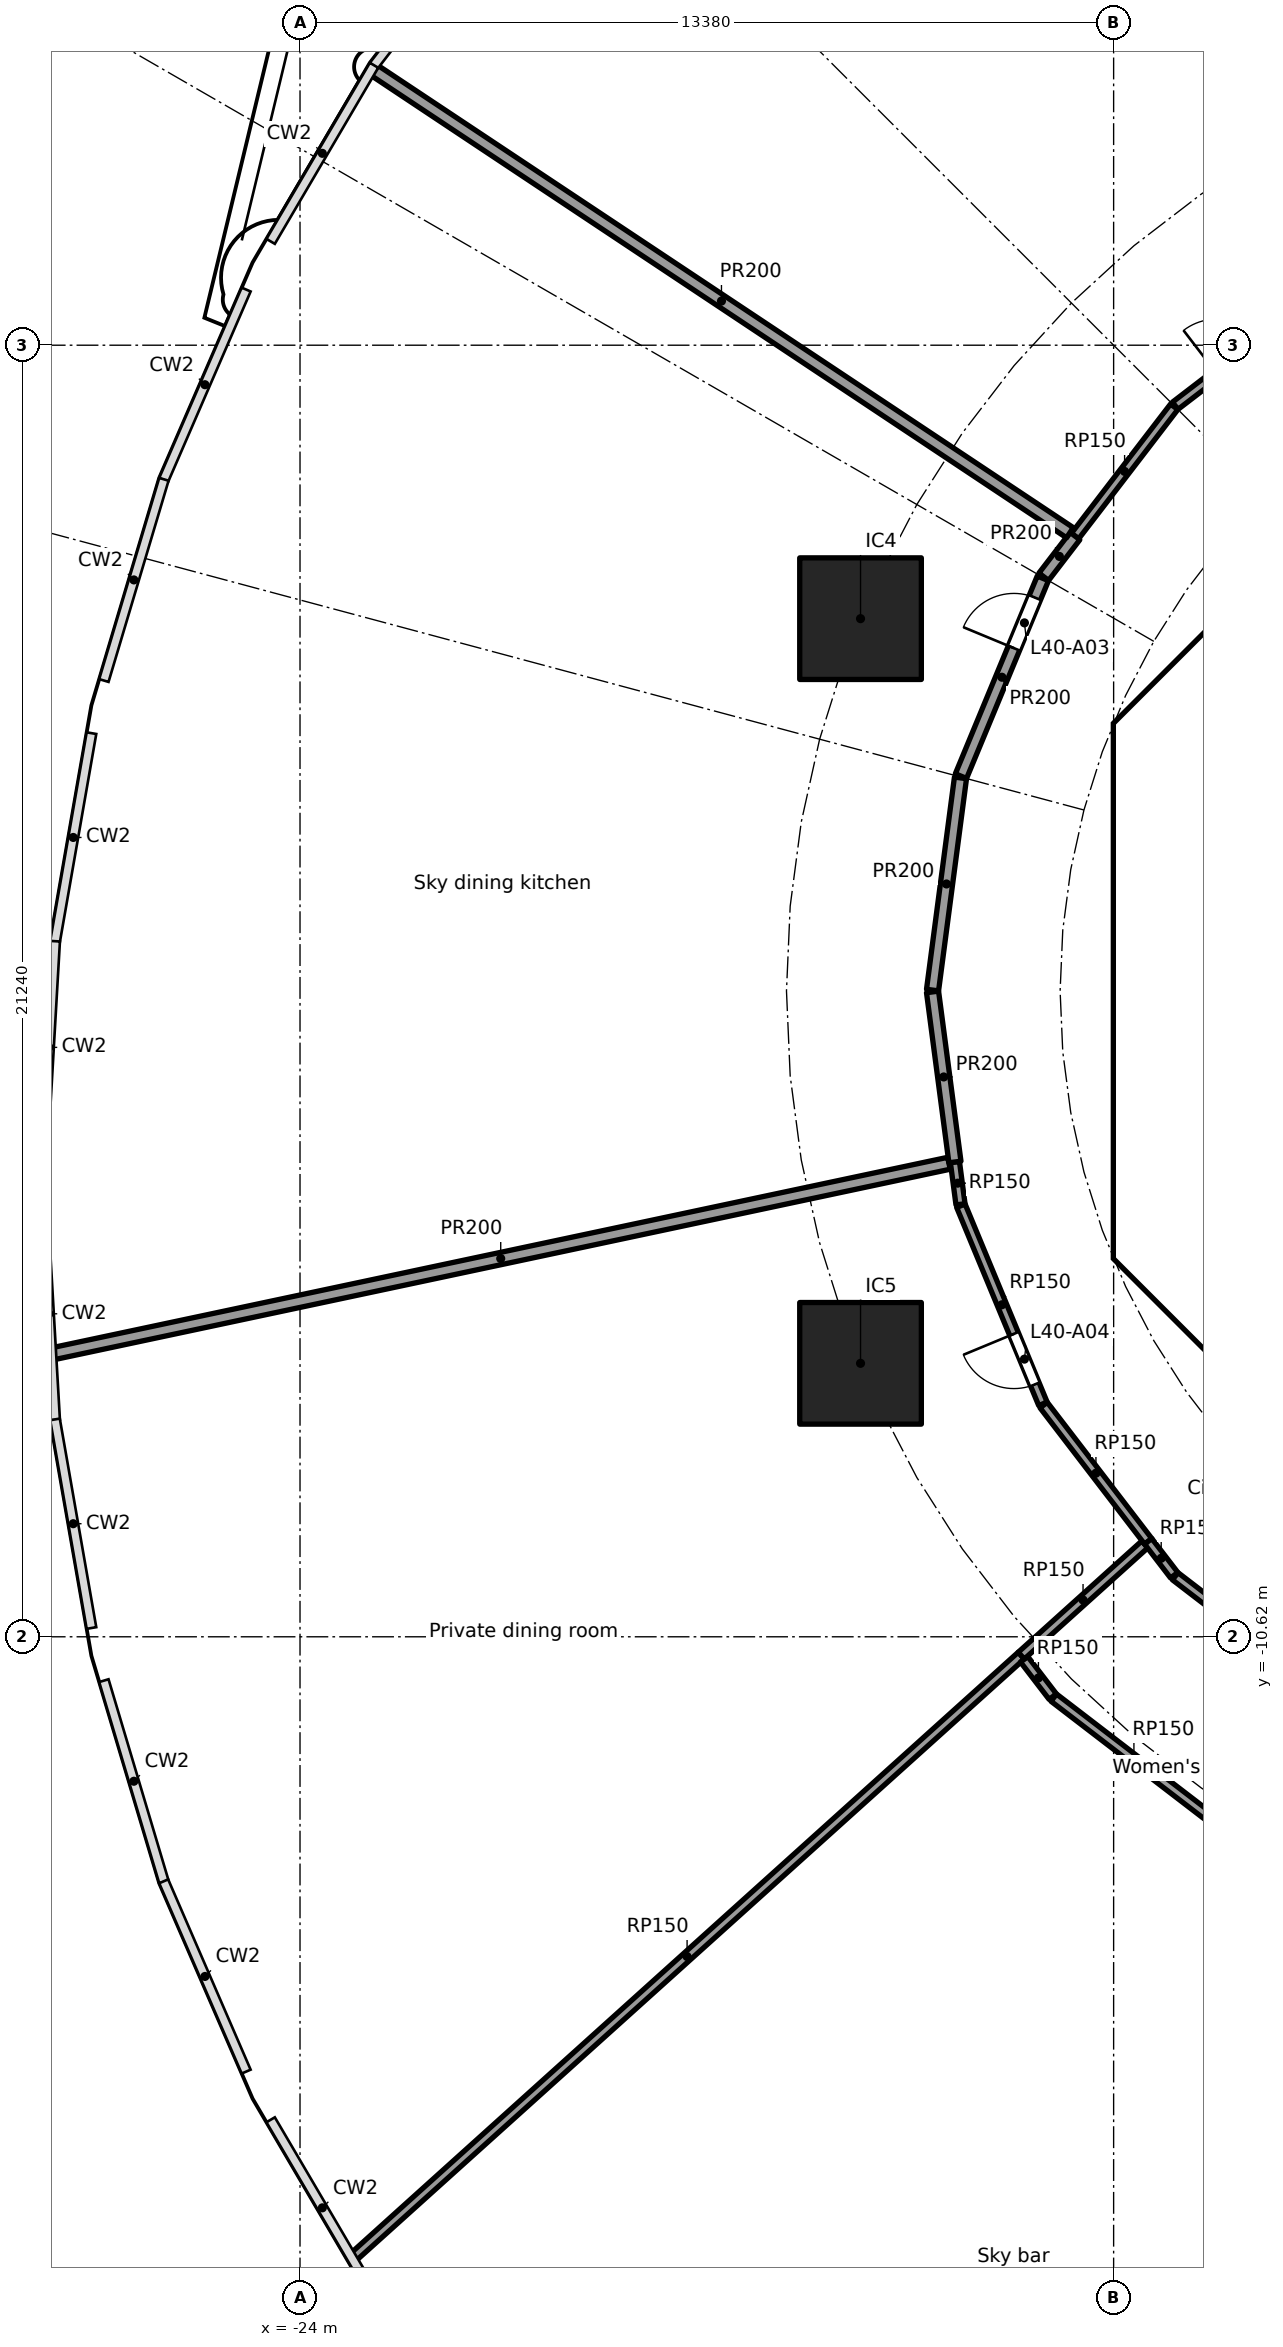
"""IFC4 building model, lengths in metres.
Left out: names, types, materials, properties, quantities, classifications, styles, units other than length and angle.
Written with IfcOpenShell. Run it as: python <this file> out.ifc"""

import sys

from ifc_helpers import new_model, si_unit, direction, frame, frame_2d, origin, origin_2d, place, context, subcontext, project, spatial, polyline, rectangle, outline, extrude, element, fill, save


model = new_model("IFC4")
c1 = context("Model", 3, precision=1e-05, world=origin(), true_north=direction((0.0, 1.0)))
c2 = subcontext(c1, "Body", "Model", "MODEL_VIEW")
j1 = project(units=[si_unit("LENGTHUNIT", "METRE"), si_unit("PLANEANGLEUNIT", "RADIAN")], contexts=[c1])
p1 = place(None, origin())
s1 = spatial("IfcSite", under=j1, at=p1, CompositionType="ELEMENT")
p2 = place(p1, origin())
s2 = spatial("IfcBuilding", under=s1, at=p2, CompositionType="ELEMENT")
p3 = place(p2, frame((0.0, 0.0, 160.3)))
s3 = spatial("IfcBuildingStorey", under=s2, at=p3, CompositionType="ELEMENT", Elevation=160.3)
for number, where, z_axis, x_axis in (
    (1, (-14.782, 6.123, 0.0), (0.0, 0.0, 1.0), (1.0, 0.0, 0.0)),
    (2, (-14.782, -6.123, 0.0), (0.0, 0.0, 1.0), (1.0, 0.0, 0.0)),
):
    element("IfcColumn", number, at=place(p3, frame(where, z_axis=z_axis, x_axis=x_axis)), inside=s3, PredefinedType="COLUMN", context=c2, shape_type="SweptSolid", body=[
        extrude(rectangle(XDim=2.0, YDim=2.0, at=origin_2d()), origin(), (0.0, 0.0, 1.0), 5.6),
    ])
p4 = place(p3, frame((-4.613, 9.988, 0.0), z_axis=(0.0, 0.0, 1.0), x_axis=(-0.707106781187, -0.707106781187, 0.0)))
e3 = element("IfcWall", 3, at=p4, inside=s3, PredefinedType="SHEAR", context=c2, shape_type="SweptSolid", body=[
    extrude(rectangle(XDim=7.602, YDim=0.6, at=frame_2d((3.801, 0.0))), origin(), (0.0, 0.0, 1.0), 5.34),
])
p5 = place(p4, frame((0.351, 0.0, 0.0)))
e4 = element("IfcOpeningElement", 4, at=p5, cuts=e3, PredefinedType="OPENING", context=c2, shape_type="SweptSolid", body=[
    extrude(rectangle(XDim=1.1, YDim=2.1, at=frame_2d((0.55, 1.05))), frame((0.0, 0.31, 0.0), z_axis=(0.0, -1.0, 0.0), x_axis=(1.0, 0.0, 0.0)), (0.0, 0.0, 1.0), 0.62),
])
p6 = place(p3, frame((-10.325, 3.801, 0.0), z_axis=(0.0, 0.0, 1.0), x_axis=(0.0, -1.0, 0.0)))
e5 = element("IfcWall", 5, at=p6, inside=s3, PredefinedType="SHEAR", context=c2, shape_type="SweptSolid", body=[
    extrude(rectangle(XDim=7.602, YDim=0.6, at=frame_2d((3.801, 0.0))), origin(), (0.0, 0.0, 1.0), 5.34),
])
p7 = place(p6, frame((0.651, 0.0, 0.0)))
e6 = element("IfcOpeningElement", 6, at=p7, cuts=e5, PredefinedType="OPENING", context=c2, shape_type="SweptSolid", body=[
    extrude(rectangle(XDim=1.5, YDim=2.1, at=frame_2d((0.75, 1.05))), frame((0.0, 0.31, 0.0), z_axis=(0.0, -1.0, 0.0), x_axis=(1.0, 0.0, 0.0)), (0.0, 0.0, 1.0), 0.62),
])
p8 = place(p6, frame((5.451, 0.0, 0.0)))
e7 = element("IfcOpeningElement", 7, at=p8, cuts=e5, PredefinedType="OPENING", context=c2, shape_type="SweptSolid", body=[
    extrude(rectangle(XDim=1.5, YDim=2.1, at=frame_2d((0.75, 1.05))), frame((0.0, 0.31, 0.0), z_axis=(0.0, -1.0, 0.0), x_axis=(1.0, 0.0, 0.0)), (0.0, 0.0, 1.0), 0.62),
])
p9 = place(p3, frame((-9.988, -4.613, 0.0), z_axis=(0.0, 0.0, 1.0), x_axis=(0.707106781187, -0.707106781187, 0.0)))
e8 = element("IfcWall", 8, at=p9, inside=s3, PredefinedType="SHEAR", context=c2, shape_type="SweptSolid", body=[
    extrude(rectangle(XDim=7.602, YDim=0.6, at=frame_2d((3.801, 0.0))), origin(), (0.0, 0.0, 1.0), 5.34),
])
p10 = place(p9, frame((6.151, 0.0, 0.0)))
e9 = element("IfcOpeningElement", 9, at=p10, cuts=e8, PredefinedType="OPENING", context=c2, shape_type="SweptSolid", body=[
    extrude(rectangle(XDim=1.1, YDim=2.1, at=frame_2d((0.55, 1.05))), frame((0.0, 0.31, 0.0), z_axis=(0.0, -1.0, 0.0), x_axis=(1.0, 0.0, 0.0)), (0.0, 0.0, 1.0), 0.62),
])
p11 = place(p3, origin())
e10 = element("IfcWall", 10, at=p11, inside=s3, PredefinedType="SHEAR", context=c2, shape_type="SweptSolid", body=[
    extrude(outline(polyline([(-10.625, -3.801), (-10.025, -3.801), (-10.025, -4.152), (-9.776, -4.401), (-10.2, -4.825), (-10.625, -4.401), (-10.625, -3.801)])), origin(), (0.0, 0.0, 1.0), 5.34),
])
p12 = place(p3, origin())
e11 = element("IfcWall", 11, at=p12, inside=s3, PredefinedType="SHEAR", context=c2, shape_type="SweptSolid", body=[
    extrude(outline(polyline([(-10.2, 4.825), (-9.776, 4.401), (-10.025, 4.152), (-10.025, 3.801), (-10.625, 3.801), (-10.625, 4.401), (-10.2, 4.825)])), origin(), (0.0, 0.0, 1.0), 5.34),
])
for number, where, z_axis, x_axis in (
    (12, (-10.025, -4.0, 0.0), (0.0, 0.0, 1.0), (1.0, 0.0, 0.0)),
    (13, (-10.025, 4.0, 0.0), (0.0, 0.0, 1.0), (1.0, 0.0, 0.0)),
):
    element("IfcWall", number, at=place(p3, frame(where, z_axis=z_axis, x_axis=x_axis)), inside=s3, PredefinedType="PARTITIONING", context=c2, shape_type="SweptSolid", body=[
        extrude(rectangle(XDim=3.325, YDim=0.2, at=frame_2d((1.662, 0.0))), origin(), (0.0, 0.0, 1.0), 5.34),
    ])
p13 = place(p3, frame((-13.138, -3.508, 0.0), z_axis=(0.0, 0.0, 1.0), x_axis=(-0.130409533429, 0.991460212813, 0.0)))
e14 = element("IfcWall", 14, at=p13, inside=s3, PredefinedType="PARTITIONING", context=c2, shape_type="SweptSolid", body=[
    extrude(rectangle(XDim=0.702, YDim=0.15, at=frame_2d((0.351, 0.0))), origin(), (0.0, 0.0, 1.0), 5.34),
])
p14 = place(p3, frame((-12.138, -10.93, 0.0), z_axis=(0.0, 0.0, 1.0), x_axis=(-0.743151323341, -0.66912338968, 0.0)))
e15 = element("IfcWall", 15, at=p14, inside=s3, PredefinedType="PARTITIONING", context=c2, shape_type="SweptSolid", body=[
    extrude(rectangle(XDim=14.791, YDim=0.15, at=frame_2d((7.396, 0.0))), origin(), (0.0, 0.0, 1.0), 5.34),
])
p15 = place(p3, frame((-11.782, -6.789, 0.0), z_axis=(0.0, 0.0, 1.0), x_axis=(-0.382677866108, 0.923881838111, 0.0)))
e16 = element("IfcWall", 16, at=p15, inside=s3, PredefinedType="PARTITIONING", context=c2, shape_type="SweptSolid", body=[
    extrude(rectangle(XDim=3.527, YDim=0.15, at=frame_2d((1.763, 0.0))), origin(), (0.0, 0.0, 1.0), 5.34),
])
p16 = place(p15, frame((0.346, 0.0, 0.0)))
e17 = element("IfcOpeningElement", 17, at=p16, cuts=e16, PredefinedType="OPENING", context=c2, shape_type="SweptSolid", body=[
    extrude(rectangle(XDim=0.9, YDim=2.1, at=frame_2d((0.45, 1.05))), frame((0.0, 0.085, 0.0), z_axis=(0.0, -1.0, 0.0), x_axis=(1.0, 0.0, 0.0)), (0.0, 0.0, 1.0), 0.17),
])
p17 = place(p3, frame((-11.621, -11.604, 0.0), z_axis=(0.0, 0.0, 1.0), x_axis=(-0.608781909099, 0.793337624945, 0.0)))
e18 = element("IfcWall", 18, at=p17, inside=s3, PredefinedType="PARTITIONING", context=c2, shape_type="SweptSolid", body=[
    extrude(rectangle(XDim=0.775, YDim=0.15, at=frame_2d((0.388, 0.0))), origin(), (0.0, 0.0, 1.0), 5.34),
])
p18 = place(p3, frame((-11.255, 7.481, 0.0), z_axis=(0.0, 0.0, 1.0), x_axis=(0.608710767698, 0.793392211512, 0.0)))
e19 = element("IfcWall", 19, at=p18, inside=s3, PredefinedType="PARTITIONING", context=c2, shape_type="SweptSolid", body=[
    extrude(rectangle(XDim=2.68, YDim=0.15, at=frame_2d((1.34, 0.0))), origin(), (0.0, 0.0, 1.0), 5.34),
])
p19 = place(p3, frame((-10.107, -9.101, 0.0), z_axis=(0.0, 0.0, 1.0), x_axis=(-0.743116473198, -0.669162093414, 0.0)))
e20 = element("IfcWall", 20, at=p19, inside=s3, PredefinedType="PARTITIONING", context=c2, shape_type="SweptSolid", body=[
    extrude(rectangle(XDim=2.733, YDim=0.15, at=frame_2d((1.367, 0.0))), origin(), (0.0, 0.0, 1.0), 5.34),
])
p20 = place(p3, frame((-10.051, -9.05, 0.0), z_axis=(0.0, 0.0, 1.0), x_axis=(-0.608745411834, 0.793365630445, 0.0)))
e21 = element("IfcWall", 21, at=p20, inside=s3, PredefinedType="PARTITIONING", context=c2, shape_type="SweptSolid", body=[
    extrude(rectangle(XDim=2.825, YDim=0.15, at=frame_2d((1.412, 0.0))), origin(), (0.0, 0.0, 1.0), 5.34),
])
p21 = place(p3, frame((-9.624, -9.607, 0.0), z_axis=(0.0, 0.0, 1.0), x_axis=(-0.608701690893, 0.793399175387, 0.0)))
e22 = element("IfcWall", 22, at=p21, inside=s3, PredefinedType="PARTITIONING", context=c2, shape_type="SweptSolid", body=[
    extrude(rectangle(XDim=0.702, YDim=0.15, at=frame_2d((0.351, 0.0))), origin(), (0.0, 0.0, 1.0), 5.34),
])
p22 = place(p3, frame((-9.607, 9.624, 0.0), z_axis=(0.0, 0.0, 1.0), x_axis=(0.793372307201, 0.608736710054, 0.0)))
e23 = element("IfcWall", 23, at=p22, inside=s3, PredefinedType="PARTITIONING", context=c2, shape_type="SweptSolid", body=[
    extrude(rectangle(XDim=3.527, YDim=0.15, at=frame_2d((1.763, 0.0))), origin(), (0.0, 0.0, 1.0), 5.34),
])
p23 = place(p22, frame((0.863, 0.0, 0.0)))
e24 = element("IfcOpeningElement", 24, at=p23, cuts=e23, PredefinedType="OPENING", context=c2, shape_type="SweptSolid", body=[
    extrude(rectangle(XDim=1.8, YDim=2.1, at=frame_2d((0.9, 1.05))), frame((0.0, 0.085, 0.0), z_axis=(0.0, -1.0, 0.0), x_axis=(1.0, 0.0, 0.0)), (0.0, 0.0, 1.0), 0.17),
])
p24 = place(p3, frame((-8.968, -13.644, 0.0), z_axis=(0.0, 0.0, 1.0), x_axis=(-0.79334728927, 0.608769314772, 0.0)))
e25 = element("IfcWall", 25, at=p24, inside=s3, PredefinedType="PARTITIONING", context=c2, shape_type="SweptSolid", body=[
    extrude(rectangle(XDim=3.323, YDim=0.15, at=frame_2d((1.661, 0.0))), origin(), (0.0, 0.0, 1.0), 5.34),
])
p25 = place(p3, frame((-7.476, -11.26, 0.0), z_axis=(0.0, 0.0, 1.0), x_axis=(-0.793376684251, 0.60873100536, 0.0)))
e26 = element("IfcWall", 26, at=p25, inside=s3, PredefinedType="PARTITIONING", context=c2, shape_type="SweptSolid", body=[
    extrude(rectangle(XDim=2.687, YDim=0.15, at=frame_2d((1.343, 0.0))), origin(), (0.0, 0.0, 1.0), 5.34),
])
p26 = place(p25, frame((0.899, 0.0, 0.0)))
e27 = element("IfcOpeningElement", 27, at=p26, cuts=e26, PredefinedType="OPENING", context=c2, shape_type="SweptSolid", body=[
    extrude(rectangle(XDim=0.9, YDim=2.1, at=frame_2d((0.45, 1.05))), frame((0.0, 0.085, 0.0), z_axis=(0.0, -1.0, 0.0), x_axis=(1.0, 0.0, 0.0)), (0.0, 0.0, 1.0), 0.17),
])
p27 = place(p3, frame((-28.071, -5.967, 0.0), z_axis=(0.0, 0.0, 1.0), x_axis=(0.978149752065, 0.20790156934, 0.0)))
e28 = element("IfcWall", 28, at=p27, inside=s3, PredefinedType="PARTITIONING", context=c2, shape_type="SweptSolid", body=[
    extrude(rectangle(XDim=15.072, YDim=0.2, at=frame_2d((7.536, 0.0))), origin(), (0.0, 0.0, 1.0), 5.34),
])
p28 = place(p3, frame((-13.598, 0.015, 0.0), z_axis=(0.0, 0.0, 1.0), x_axis=(0.130468866457, 0.991452406768, 0.0)))
e29 = element("IfcWall", 29, at=p28, inside=s3, PredefinedType="PARTITIONING", context=c2, shape_type="SweptSolid", body=[
    extrude(rectangle(XDim=3.52, YDim=0.2, at=frame_2d((1.76, 0.0))), origin(), (0.0, 0.0, 1.0), 5.34),
])
p29 = place(p3, frame((-13.23, -2.812, 0.0), z_axis=(0.0, 0.0, 1.0), x_axis=(-0.130508241489, 0.991447224467, 0.0)))
e30 = element("IfcWall", 30, at=p29, inside=s3, PredefinedType="PARTITIONING", context=c2, shape_type="SweptSolid", body=[
    extrude(rectangle(XDim=2.821, YDim=0.2, at=frame_2d((1.411, 0.0))), origin(), (0.0, 0.0, 1.0), 5.34),
])
p30 = place(p3, frame((-13.131, 3.534, 0.0), z_axis=(0.0, 0.0, 1.0), x_axis=(0.382723413813, 0.92386297064, 0.0)))
e31 = element("IfcWall", 31, at=p30, inside=s3, PredefinedType="PARTITIONING", context=c2, shape_type="SweptSolid", body=[
    extrude(rectangle(XDim=3.52, YDim=0.2, at=frame_2d((1.76, 0.0))), origin(), (0.0, 0.0, 1.0), 5.34),
])
p31 = place(p30, frame((2.278, 0.0, 0.0)))
e32 = element("IfcOpeningElement", 32, at=p31, cuts=e31, PredefinedType="OPENING", context=c2, shape_type="SweptSolid", body=[
    extrude(rectangle(XDim=0.9, YDim=2.1, at=frame_2d((0.45, 1.05))), frame((0.0, 0.11, 0.0), z_axis=(0.0, -1.0, 0.0), x_axis=(1.0, 0.0, 0.0)), (0.0, 0.0, 1.0), 0.22),
])
p32 = place(p3, frame((-11.769, 6.812, 0.0), z_axis=(0.0, 0.0, 1.0), x_axis=(0.60871710749, 0.793387347422, 0.0)))
e33 = element("IfcWall", 33, at=p32, inside=s3, PredefinedType="PARTITIONING", context=c2, shape_type="SweptSolid", body=[
    extrude(rectangle(XDim=0.844, YDim=0.2, at=frame_2d((0.422, 0.0))), origin(), (0.0, 0.0, 1.0), 5.34),
])
p33 = place(p3, frame((-11.339, 7.537, 0.0), z_axis=(0.0, 0.0, 1.0), x_axis=(-0.832816424089, 0.553549278536, 0.0)))
e34 = element("IfcWall", 34, at=p33, inside=s3, PredefinedType="PARTITIONING", context=c2, shape_type="SweptSolid", body=[
    extrude(rectangle(XDim=13.762, YDim=0.2, at=frame_2d((6.881, 0.0))), origin(), (0.0, 0.0, 1.0), 5.34),
])
p34 = place(p7, origin())
e35 = element("IfcDoor", 35, at=p34, inside=s3, OperationType="DOUBLE_DOOR_SINGLE_SWING", PredefinedType="DOOR", context=c2, shape_type="SweptSolid", body=[
    extrude(rectangle(XDim=1.5, YDim=2.1, at=frame_2d((0.75, 1.05))), frame((0.0, 0.025, 0.0), z_axis=(0.0, -1.0, 0.0), x_axis=(1.0, 0.0, 0.0)), (0.0, 0.0, 1.0), 0.05),
])
fill(e6, e35)
p35 = place(p8, origin())
e36 = element("IfcDoor", 36, at=p35, inside=s3, OperationType="DOUBLE_DOOR_SINGLE_SWING", PredefinedType="DOOR", context=c2, shape_type="SweptSolid", body=[
    extrude(rectangle(XDim=1.5, YDim=2.1, at=frame_2d((0.75, 1.05))), frame((0.0, 0.025, 0.0), z_axis=(0.0, -1.0, 0.0), x_axis=(1.0, 0.0, 0.0)), (0.0, 0.0, 1.0), 0.05),
])
fill(e7, e36)
p36 = place(p31, origin())
e37 = element("IfcDoor", 37, at=p36, inside=s3, OperationType="SINGLE_SWING_LEFT", PredefinedType="DOOR", context=c2, shape_type="SweptSolid", body=[
    extrude(rectangle(XDim=0.9, YDim=2.1, at=frame_2d((0.45, 1.05))), frame((0.0, 0.025, 0.0), z_axis=(0.0, -1.0, 0.0), x_axis=(1.0, 0.0, 0.0)), (0.0, 0.0, 1.0), 0.05),
])
fill(e32, e37)
p37 = place(p16, origin())
e38 = element("IfcDoor", 38, at=p37, inside=s3, OperationType="SINGLE_SWING_RIGHT", PredefinedType="DOOR", context=c2, shape_type="SweptSolid", body=[
    extrude(rectangle(XDim=0.9, YDim=2.1, at=frame_2d((0.45, 1.05))), frame((0.0, 0.025, 0.0), z_axis=(0.0, -1.0, 0.0), x_axis=(1.0, 0.0, 0.0)), (0.0, 0.0, 1.0), 0.05),
])
fill(e17, e38)
save(model, sys.argv[1])
